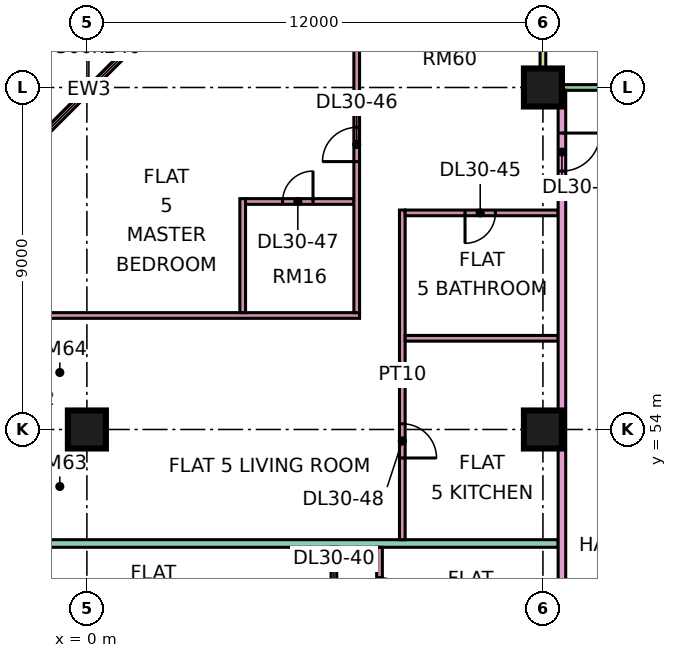
"""IFC4 building model, lengths in metres.
Left out: names, types, materials, properties, quantities, classifications, styles, units other than length and angle.
Written with IfcOpenShell. Run it as: python <this file> out.ifc"""

import sys

from ifc_helpers import new_model, si_unit, direction, frame, frame_2d, origin, origin_2d, place, context, subcontext, project, spatial, rectangle, extrude, element, fill, save


model = new_model("IFC4")
c1 = context("Model", 3, precision=1e-05, world=origin(), true_north=direction((0.0, 1.0)))
c2 = subcontext(c1, "Body", "Model", "MODEL_VIEW")
j1 = project(units=[si_unit("LENGTHUNIT", "METRE"), si_unit("PLANEANGLEUNIT", "RADIAN")], contexts=[c1])
p1 = place(None, origin())
s1 = spatial("IfcSite", under=j1, at=p1, CompositionType="ELEMENT")
p2 = place(p1, origin())
s2 = spatial("IfcBuilding", under=s1, at=p2, CompositionType="ELEMENT")
p3 = place(p2, frame((0.0, 0.0, 129.4)))
s3 = spatial("IfcBuildingStorey", under=s2, at=p3, CompositionType="ELEMENT", Elevation=129.4)
for number, where, z_axis, x_axis in (
    (1, (0.0, 54.0, 0.0), (0.0, 0.0, 1.0), (1.0, 0.0, 0.0)),
    (2, (12.0, 54.0, 0.0), (0.0, 0.0, 1.0), (1.0, 0.0, 0.0)),
    (3, (12.0, 63.0, 0.0), (0.0, 0.0, 1.0), (1.0, 0.0, 0.0)),
):
    element("IfcColumn", number, at=place(p3, frame(where, z_axis=z_axis, x_axis=x_axis)), inside=s3, PredefinedType="COLUMN", context=c2, shape_type="SweptSolid", body=[
        extrude(rectangle(XDim=1.0, YDim=1.0, at=origin_2d()), origin(), (0.0, 0.0, 1.0), 3.75),
    ])
p4 = place(p3, frame((22.425, 63.0, 0.0), z_axis=(0.0, 0.0, 1.0), x_axis=(-1.0, 0.0, 0.0)))
e4 = element("IfcWall", 4, at=p4, inside=s3, PredefinedType="SOLIDWALL", context=c2, shape_type="SweptSolid", body=[
    extrude(rectangle(XDim=10.35, YDim=0.15, at=frame_2d((5.175, 0.0))), origin(), (0.0, 0.0, 1.0), 3.35),
])
p5 = place(p4, frame((0.562, 0.0, 0.45)))
e5 = element("IfcOpeningElement", 5, at=p5, cuts=e4, PredefinedType="OPENING", context=c2, shape_type="SweptSolid", body=[
    extrude(rectangle(XDim=1.8, YDim=2.4, at=frame_2d((0.9, 1.2))), frame((0.0, 0.085, 0.0), z_axis=(0.0, -1.0, 0.0), x_axis=(1.0, 0.0, 0.0)), (0.0, 0.0, 1.0), 0.17),
])
p6 = place(p4, frame((4.575, 0.0, 0.45)))
e6 = element("IfcOpeningElement", 6, at=p6, cuts=e4, PredefinedType="OPENING", context=c2, shape_type="SweptSolid", body=[
    extrude(rectangle(XDim=1.8, YDim=2.4, at=frame_2d((0.9, 1.2))), frame((0.0, 0.085, 0.0), z_axis=(0.0, -1.0, 0.0), x_axis=(1.0, 0.0, 0.0)), (0.0, 0.0, 1.0), 0.17),
])
p7 = place(p3, frame((12.0, 64.5, 0.0), z_axis=(0.0, 0.0, 1.0), x_axis=(0.0, -1.0, 0.0)))
e7 = element("IfcWall", 7, at=p7, inside=s3, PredefinedType="SOLIDWALL", context=c2, shape_type="SweptSolid", body=[
    extrude(rectangle(XDim=1.5, YDim=0.15, at=frame_2d((0.75, 0.0))), origin(), (0.0, 0.0, 1.0), 3.35),
])
p8 = place(p3, frame((1.553, 64.447, 0.0), z_axis=(0.0, 0.0, 1.0), x_axis=(-0.707106781187, -0.707106781187, 0.0)))
e8 = element("IfcWall", 8, at=p8, inside=s3, PredefinedType="SOLIDWALL", context=c2, shape_type="SweptSolid", body=[
    extrude(rectangle(XDim=4.243, YDim=0.15, at=frame_2d((2.121, 0.0))), origin(), (0.0, 0.0, 1.0), 3.35),
])
p9 = place(p8, frame((0.621, 0.0, 0.45)))
e9 = element("IfcOpeningElement", 9, at=p9, cuts=e8, PredefinedType="OPENING", context=c2, shape_type="SweptSolid", body=[
    extrude(rectangle(XDim=3.0, YDim=2.4, at=frame_2d((1.5, 1.2))), frame((0.0, 0.085, 0.0), z_axis=(0.0, -1.0, 0.0), x_axis=(1.0, 0.0, 0.0)), (0.0, 0.0, 1.0), 0.17),
])
p10 = place(p3, frame((-1.35, 51.0, 0.0), z_axis=(0.0, 0.0, 1.0), x_axis=(1.0, 0.0, 0.0)))
e10 = element("IfcWall", 10, at=p10, inside=s3, PredefinedType="PARTITIONING", context=c2, shape_type="SweptSolid", body=[
    extrude(rectangle(XDim=13.75, YDim=0.2, at=frame_2d((6.875, 0.0))), origin(), (0.0, 0.0, 1.0), 3.35),
])
p11 = place(p3, frame((-1.35, 57.0, 0.0), z_axis=(0.0, 0.0, 1.0), x_axis=(1.0, 0.0, 0.0)))
e11 = element("IfcWall", 11, at=p11, inside=s3, PredefinedType="PARTITIONING", context=c2, shape_type="SweptSolid", body=[
    extrude(rectangle(XDim=8.525, YDim=0.15, at=frame_2d((4.263, 0.0))), origin(), (0.0, 0.0, 1.0), 3.35),
])
p12 = place(p3, frame((4.1, 57.075, 0.0), z_axis=(0.0, 0.0, 1.0), x_axis=(0.0, 1.0, 0.0)))
e12 = element("IfcWall", 12, at=p12, inside=s3, PredefinedType="PARTITIONING", context=c2, shape_type="SweptSolid", body=[
    extrude(rectangle(XDim=3.0, YDim=0.15, at=frame_2d((1.5, 0.0))), origin(), (0.0, 0.0, 1.0), 3.35),
])
p13 = place(p3, frame((4.175, 60.0, 0.0), z_axis=(0.0, 0.0, 1.0), x_axis=(1.0, 0.0, 0.0)))
e13 = element("IfcWall", 13, at=p13, inside=s3, PredefinedType="PARTITIONING", context=c2, shape_type="SweptSolid", body=[
    extrude(rectangle(XDim=2.85, YDim=0.15, at=frame_2d((1.425, 0.0))), origin(), (0.0, 0.0, 1.0), 3.35),
])
p14 = place(p13, frame((0.975, 0.0, 0.0)))
e14 = element("IfcOpeningElement", 14, at=p14, cuts=e13, PredefinedType="OPENING", context=c2, shape_type="SweptSolid", body=[
    extrude(rectangle(XDim=0.8, YDim=2.1, at=frame_2d((0.4, 1.05))), frame((0.0, 0.085, 0.0), z_axis=(0.0, -1.0, 0.0), x_axis=(1.0, 0.0, 0.0)), (0.0, 0.0, 1.0), 0.17),
])
p15 = place(p3, frame((6.5, 41.95, 0.0), z_axis=(0.0, 0.0, 1.0), x_axis=(0.0, 1.0, 0.0)))
e15 = element("IfcWall", 15, at=p15, inside=s3, PredefinedType="PARTITIONING", context=c2, shape_type="SweptSolid", body=[
    extrude(rectangle(XDim=8.95, YDim=0.15, at=frame_2d((4.475, 0.0))), origin(), (0.0, 0.0, 1.0), 3.35),
])
p16 = place(p15, frame((1.1, 0.0, 0.0)))
e16 = element("IfcOpeningElement", 16, at=p16, cuts=e15, PredefinedType="OPENING", context=c2, shape_type="SweptSolid", body=[
    extrude(rectangle(XDim=0.9, YDim=2.1, at=frame_2d((0.45, 1.05))), frame((0.0, 0.085, 0.0), z_axis=(0.0, -1.0, 0.0), x_axis=(1.0, 0.0, 0.0)), (0.0, 0.0, 1.0), 0.17),
])
p17 = place(p15, frame((7.1, 0.0, 0.0)))
e17 = element("IfcOpeningElement", 17, at=p17, cuts=e15, PredefinedType="OPENING", context=c2, shape_type="SweptSolid", body=[
    extrude(rectangle(XDim=0.9, YDim=2.1, at=frame_2d((0.45, 1.05))), frame((0.0, 0.085, 0.0), z_axis=(0.0, -1.0, 0.0), x_axis=(1.0, 0.0, 0.0)), (0.0, 0.0, 1.0), 0.17),
])
p18 = place(p3, frame((7.1, 57.075, 0.0), z_axis=(0.0, 0.0, 1.0), x_axis=(0.0, 1.0, 0.0)))
e18 = element("IfcWall", 18, at=p18, inside=s3, PredefinedType="PARTITIONING", context=c2, shape_type="SweptSolid", body=[
    extrude(rectangle(XDim=7.275, YDim=0.15, at=frame_2d((3.638, 0.0))), origin(), (0.0, 0.0, 1.0), 3.35),
])
p19 = place(p18, frame((3.975, 0.0, 0.0)))
e19 = element("IfcOpeningElement", 19, at=p19, cuts=e18, PredefinedType="OPENING", context=c2, shape_type="SweptSolid", body=[
    extrude(rectangle(XDim=0.9, YDim=2.1, at=frame_2d((0.45, 1.05))), frame((0.0, 0.085, 0.0), z_axis=(0.0, -1.0, 0.0), x_axis=(1.0, 0.0, 0.0)), (0.0, 0.0, 1.0), 0.17),
])
p20 = place(p3, frame((7.7, 39.525, 0.0), z_axis=(0.0, 0.0, 1.0), x_axis=(0.0, 1.0, 0.0)))
e20 = element("IfcWall", 20, at=p20, inside=s3, PredefinedType="PARTITIONING", context=c2, shape_type="SweptSolid", body=[
    extrude(rectangle(XDim=11.375, YDim=0.15, at=frame_2d((5.688, 0.0))), origin(), (0.0, 0.0, 1.0), 3.35),
])
p21 = place(p20, frame((0.825, 0.0, 0.0)))
e21 = element("IfcOpeningElement", 21, at=p21, cuts=e20, PredefinedType="OPENING", context=c2, shape_type="SweptSolid", body=[
    extrude(rectangle(XDim=0.8, YDim=2.1, at=frame_2d((0.4, 1.05))), frame((0.0, 0.085, 0.0), z_axis=(0.0, -1.0, 0.0), x_axis=(1.0, 0.0, 0.0)), (0.0, 0.0, 1.0), 0.17),
])
p22 = place(p20, frame((5.175, 0.0, 0.0)))
e22 = element("IfcOpeningElement", 22, at=p22, cuts=e20, PredefinedType="OPENING", context=c2, shape_type="SweptSolid", body=[
    extrude(rectangle(XDim=0.9, YDim=2.1, at=frame_2d((0.45, 1.05))), frame((0.0, 0.085, 0.0), z_axis=(0.0, -1.0, 0.0), x_axis=(1.0, 0.0, 0.0)), (0.0, 0.0, 1.0), 0.17),
])
p23 = place(p20, frame((9.675, 0.0, 0.0)))
e23 = element("IfcOpeningElement", 23, at=p23, cuts=e20, PredefinedType="OPENING", context=c2, shape_type="SweptSolid", body=[
    extrude(rectangle(XDim=0.9, YDim=2.1, at=frame_2d((0.45, 1.05))), frame((0.0, 0.085, 0.0), z_axis=(0.0, -1.0, 0.0), x_axis=(1.0, 0.0, 0.0)), (0.0, 0.0, 1.0), 0.17),
])
p24 = place(p3, frame((8.3, 51.1, 0.0), z_axis=(0.0, 0.0, 1.0), x_axis=(0.0, 1.0, 0.0)))
e24 = element("IfcWall", 24, at=p24, inside=s3, PredefinedType="PARTITIONING", context=c2, shape_type="SweptSolid", body=[
    extrude(rectangle(XDim=8.675, YDim=0.15, at=frame_2d((4.337, 0.0))), origin(), (0.0, 0.0, 1.0), 3.35),
])
p25 = place(p24, frame((2.15, 0.0, 0.0)))
e25 = element("IfcOpeningElement", 25, at=p25, cuts=e24, PredefinedType="OPENING", context=c2, shape_type="SweptSolid", body=[
    extrude(rectangle(XDim=0.9, YDim=2.1, at=frame_2d((0.45, 1.05))), frame((0.0, 0.085, 0.0), z_axis=(0.0, -1.0, 0.0), x_axis=(1.0, 0.0, 0.0)), (0.0, 0.0, 1.0), 0.17),
])
p26 = place(p3, frame((8.375, 56.4, 0.0), z_axis=(0.0, 0.0, 1.0), x_axis=(1.0, 0.0, 0.0)))
e26 = element("IfcWall", 26, at=p26, inside=s3, PredefinedType="PARTITIONING", context=c2, shape_type="SweptSolid", body=[
    extrude(rectangle(XDim=4.025, YDim=0.15, at=frame_2d((2.012, 0.0))), origin(), (0.0, 0.0, 1.0), 3.35),
])
p27 = place(p3, frame((8.375, 59.7, 0.0), z_axis=(0.0, 0.0, 1.0), x_axis=(1.0, 0.0, 0.0)))
e27 = element("IfcWall", 27, at=p27, inside=s3, PredefinedType="PARTITIONING", context=c2, shape_type="SweptSolid", body=[
    extrude(rectangle(XDim=4.025, YDim=0.15, at=frame_2d((2.012, 0.0))), origin(), (0.0, 0.0, 1.0), 3.35),
])
p28 = place(p27, frame((1.575, 0.0, 0.0)))
e28 = element("IfcOpeningElement", 28, at=p28, cuts=e27, PredefinedType="OPENING", context=c2, shape_type="SweptSolid", body=[
    extrude(rectangle(XDim=0.8, YDim=2.1, at=frame_2d((0.4, 1.05))), frame((0.0, 0.085, 0.0), z_axis=(0.0, -1.0, 0.0), x_axis=(1.0, 0.0, 0.0)), (0.0, 0.0, 1.0), 0.17),
])
p29 = place(p3, frame((12.5, 20.0, 0.0), z_axis=(0.0, 0.0, 1.0), x_axis=(0.0, 1.0, 0.0)))
e29 = element("IfcWall", 29, at=p29, inside=s3, PredefinedType="PARTITIONING", context=c2, shape_type="SweptSolid", body=[
    extrude(rectangle(XDim=42.926, YDim=0.2, at=frame_2d((21.463, 0.0))), origin(), (0.0, 0.0, 1.0), 3.35),
])
p30 = place(p29, frame((17.25, 0.0, 0.0)))
e30 = element("IfcOpeningElement", 30, at=p30, cuts=e29, PredefinedType="OPENING", context=c2, shape_type="SweptSolid", body=[
    extrude(rectangle(XDim=1.0, YDim=2.1, at=frame_2d((0.5, 1.05))), frame((0.0, 0.11, 0.0), z_axis=(0.0, -1.0, 0.0), x_axis=(1.0, 0.0, 0.0)), (0.0, 0.0, 1.0), 0.22),
])
p31 = place(p29, frame((40.8, 0.0, 0.0)))
e31 = element("IfcOpeningElement", 31, at=p31, cuts=e29, PredefinedType="OPENING", context=c2, shape_type="SweptSolid", body=[
    extrude(rectangle(XDim=1.0, YDim=2.1, at=frame_2d((0.5, 1.05))), frame((0.0, 0.11, 0.0), z_axis=(0.0, -1.0, 0.0), x_axis=(1.0, 0.0, 0.0)), (0.0, 0.0, 1.0), 0.22),
])
p32 = place(p29, frame((0.6, 0.0, 0.0)))
e32 = element("IfcOpeningElement", 32, at=p32, cuts=e29, PredefinedType="OPENING", context=c2, shape_type="SweptSolid", body=[
    extrude(rectangle(XDim=1.2, YDim=2.1, at=frame_2d((0.6, 1.05))), frame((0.0, 0.11, 0.0), z_axis=(0.0, -1.0, 0.0), x_axis=(1.0, 0.0, 0.0)), (0.0, 0.0, 1.0), 0.22),
])
p33 = place(p29, frame((13.65, 0.0, 0.0)))
e33 = element("IfcOpeningElement", 33, at=p33, cuts=e29, PredefinedType="OPENING", context=c2, shape_type="SweptSolid", body=[
    extrude(rectangle(XDim=1.0, YDim=2.1, at=frame_2d((0.5, 1.05))), frame((0.0, 0.11, 0.0), z_axis=(0.0, -1.0, 0.0), x_axis=(1.0, 0.0, 0.0)), (0.0, 0.0, 1.0), 0.22),
])
p34 = place(p9, origin())
e34 = element("IfcWindow", 34, at=p34, inside=s3, PartitioningType="SINGLE_PANEL", PredefinedType="WINDOW", context=c2, shape_type="SweptSolid", body=[
    extrude(rectangle(XDim=3.0, YDim=2.4, at=frame_2d((1.5, 1.2))), frame((0.0, 0.03, 0.0), z_axis=(0.0, -1.0, 0.0), x_axis=(1.0, 0.0, 0.0)), (0.0, 0.0, 1.0), 0.06),
])
fill(e9, e34)
p35 = place(p23, frame((0.9, 0.0, 0.0), z_axis=(0.0, 0.0, 1.0), x_axis=(-1.0, 0.0, 0.0)))
e35 = element("IfcDoor", 35, at=p35, inside=s3, OperationType="SINGLE_SWING_LEFT", PredefinedType="DOOR", context=c2, shape_type="SweptSolid", body=[
    extrude(rectangle(XDim=0.9, YDim=2.1, at=frame_2d((0.45, 1.05))), frame((0.0, 0.025, 0.0), z_axis=(0.0, -1.0, 0.0), x_axis=(1.0, 0.0, 0.0)), (0.0, 0.0, 1.0), 0.05),
])
fill(e23, e35)
p36 = place(p28, frame((0.8, 0.0, 0.0), z_axis=(0.0, 0.0, 1.0), x_axis=(-1.0, 0.0, 0.0)))
e36 = element("IfcDoor", 36, at=p36, inside=s3, OperationType="SINGLE_SWING_LEFT", PredefinedType="DOOR", context=c2, shape_type="SweptSolid", body=[
    extrude(rectangle(XDim=0.8, YDim=2.1, at=frame_2d((0.4, 1.05))), frame((0.0, 0.025, 0.0), z_axis=(0.0, -1.0, 0.0), x_axis=(1.0, 0.0, 0.0)), (0.0, 0.0, 1.0), 0.05),
])
fill(e28, e36)
p37 = place(p19, origin())
e37 = element("IfcDoor", 37, at=p37, inside=s3, OperationType="SINGLE_SWING_LEFT", PredefinedType="DOOR", context=c2, shape_type="SweptSolid", body=[
    extrude(rectangle(XDim=0.9, YDim=2.1, at=frame_2d((0.45, 1.05))), frame((0.0, 0.025, 0.0), z_axis=(0.0, -1.0, 0.0), x_axis=(1.0, 0.0, 0.0)), (0.0, 0.0, 1.0), 0.05),
])
fill(e19, e37)
p38 = place(p14, frame((0.8, 0.0, 0.0), z_axis=(0.0, 0.0, 1.0), x_axis=(-1.0, 0.0, 0.0)))
e38 = element("IfcDoor", 38, at=p38, inside=s3, OperationType="SINGLE_SWING_RIGHT", PredefinedType="DOOR", context=c2, shape_type="SweptSolid", body=[
    extrude(rectangle(XDim=0.8, YDim=2.1, at=frame_2d((0.4, 1.05))), frame((0.0, 0.025, 0.0), z_axis=(0.0, -1.0, 0.0), x_axis=(1.0, 0.0, 0.0)), (0.0, 0.0, 1.0), 0.05),
])
fill(e14, e38)
p39 = place(p25, frame((0.9, 0.0, 0.0), z_axis=(0.0, 0.0, 1.0), x_axis=(-1.0, 0.0, 0.0)))
e39 = element("IfcDoor", 39, at=p39, inside=s3, OperationType="SINGLE_SWING_LEFT", PredefinedType="DOOR", context=c2, shape_type="SweptSolid", body=[
    extrude(rectangle(XDim=0.9, YDim=2.1, at=frame_2d((0.45, 1.05))), frame((0.0, 0.025, 0.0), z_axis=(0.0, -1.0, 0.0), x_axis=(1.0, 0.0, 0.0)), (0.0, 0.0, 1.0), 0.05),
])
fill(e25, e39)
p40 = place(p31, origin())
e40 = element("IfcDoor", 40, at=p40, inside=s3, OperationType="SINGLE_SWING_RIGHT", PredefinedType="DOOR", context=c2, shape_type="SweptSolid", body=[
    extrude(rectangle(XDim=1.0, YDim=2.1, at=frame_2d((0.5, 1.05))), frame((0.0, 0.025, 0.0), z_axis=(0.0, -1.0, 0.0), x_axis=(1.0, 0.0, 0.0)), (0.0, 0.0, 1.0), 0.05),
])
fill(e31, e40)
save(model, sys.argv[1])
